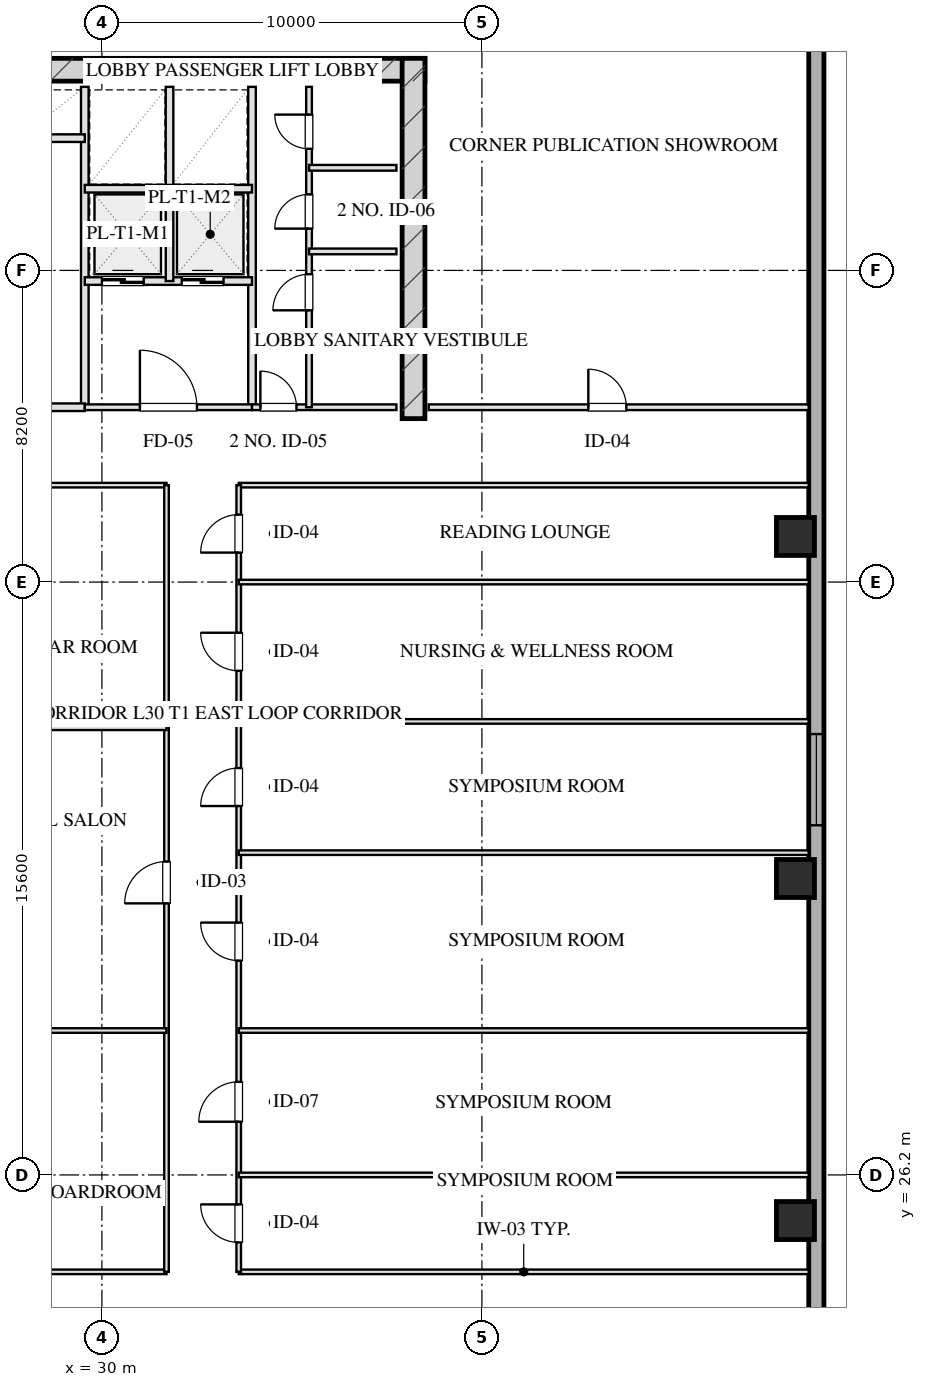
"""IFC4 building model, lengths in metres.
Left out: names, types, materials, properties, quantities, classifications, styles, units other than length and angle.
Written with IfcOpenShell. Run it as: python <this file> out.ifc"""

import sys

from ifc_helpers import new_model, si_unit, direction, frame, frame_2d, origin, origin_2d, place, context, subcontext, project, spatial, rectangle, hollow_rectangle, extrude, element, fill, save


model = new_model("IFC4")
c1 = context("Model", 3, precision=1e-05, world=origin(), true_north=direction((0.0, 1.0)))
c2 = subcontext(c1, "Body", "Model", "MODEL_VIEW")
j1 = project(units=[si_unit("LENGTHUNIT", "METRE"), si_unit("PLANEANGLEUNIT", "RADIAN")], contexts=[c1])
p1 = place(None, origin())
s1 = spatial("IfcSite", under=j1, at=p1, CompositionType="ELEMENT")
p2 = place(p1, origin())
s2 = spatial("IfcBuilding", under=s1, at=p2, CompositionType="ELEMENT")
p3 = place(p2, frame((0.0, 0.0, 117.3)))
s3 = spatial("IfcBuildingStorey", under=s2, at=p3, CompositionType="ELEMENT", Elevation=117.3)
p4 = place(p3, frame((21.5, 55.28, 0.0), z_axis=(0.0, 0.0, 1.0), x_axis=(1.0, 0.0, 0.0)))
e1 = element("IfcWall", 1, at=p4, inside=s3, PredefinedType="SHEAR", context=c2, shape_type="SweptSolid", body=[
    extrude(rectangle(XDim=17.0, YDim=0.6, at=frame_2d((8.5, 0.0))), origin(), (0.0, 0.0, 1.0), 3.45),
])
p5 = place(p3, frame((38.2, 46.1, 0.0), z_axis=(0.0, 0.0, 1.0), x_axis=(0.0, 1.0, 0.0)))
e2 = element("IfcWall", 2, at=p5, inside=s3, PredefinedType="SHEAR", context=c2, shape_type="SweptSolid", body=[
    extrude(rectangle(XDim=9.48, YDim=0.6, at=frame_2d((4.74, 0.0))), origin(), (0.0, 0.0, 1.0), 3.45),
])
for number, where, z_axis, x_axis in (
    (3, (48.25, 25.0, 0.0), (0.0, 0.0, 1.0), (1.0, 0.0, 0.0)),
    (4, (48.25, 34.0, 0.0), (0.0, 0.0, 1.0), (1.0, 0.0, 0.0)),
    (5, (48.25, 43.0, 0.0), (0.0, 0.0, 1.0), (1.0, 0.0, 0.0)),
):
    element("IfcColumn", number, at=place(p3, frame(where, z_axis=z_axis, x_axis=x_axis)), inside=s3, PredefinedType="COLUMN", context=c2, shape_type="SweptSolid", body=[
        extrude(hollow_rectangle(XDim=1.0, YDim=1.0, WallThickness=0.036, at=origin_2d()), origin(), (0.0, 0.0, 1.0), 3.451),
    ])
p6 = place(p3, frame((48.8, 59.0, 0.0), z_axis=(0.0, 0.0, 1.0), x_axis=(0.0, -1.0, 0.0)))
e6 = element("IfcWall", 6, at=p6, inside=s3, PredefinedType="SOLIDWALL", context=c2, shape_type="SweptSolid", body=[
    extrude(rectangle(XDim=50.0, YDim=0.4, at=frame_2d((25.0, 0.0))), origin(), (0.0, 0.0, 1.0), 2.61),
])
p7 = place(p6, frame((21.2, 0.0, 0.75)))
e7 = element("IfcOpeningElement", 7, at=p7, cuts=e6, PredefinedType="OPENING", context=c2, shape_type="SweptSolid", body=[
    extrude(rectangle(XDim=2.4, YDim=1.46, at=frame_2d((1.2, 0.73))), frame((0.0, 0.21, 0.0), z_axis=(0.0, -1.0, 0.0), x_axis=(1.0, 0.0, 0.0)), (0.0, 0.0, 1.0), 0.42),
])
p8 = place(p3, frame((29.55, 46.4, 0.0), z_axis=(0.0, 0.0, 1.0), x_axis=(0.0, 1.0, 0.0)))
e8 = element("IfcWall", 8, at=p8, inside=s3, PredefinedType="PARTITIONING", context=c2, shape_type="SweptSolid", body=[
    extrude(rectangle(XDim=8.43, YDim=0.2, at=frame_2d((4.215, 0.0))), origin(), (0.0, 0.0, 1.0), 3.175),
])
p9 = place(p3, frame((25.72, 46.4, 0.0), z_axis=(0.0, 0.0, 1.0), x_axis=(1.0, 0.0, 0.0)))
e9 = element("IfcWall", 9, at=p9, inside=s3, PredefinedType="PARTITIONING", context=c2, shape_type="SweptSolid", body=[
    extrude(rectangle(XDim=3.83, YDim=0.2, at=frame_2d((1.915, 0.0))), origin(), (0.0, 0.0, 1.0), 3.175),
])
p10 = place(p9, frame((1.35, 0.0, 0.0)))
e10 = element("IfcOpeningElement", 10, at=p10, cuts=e9, PredefinedType="OPENING", context=c2, shape_type="SweptSolid", body=[
    extrude(rectangle(XDim=1.2, YDim=2.05, at=frame_2d((0.6, 1.025))), frame((0.0, 0.11, 0.0), z_axis=(0.0, -1.0, 0.0), x_axis=(1.0, 0.0, 0.0)), (0.0, 0.0, 1.0), 0.22),
])
p11 = place(p3, frame((27.82, 53.48, 0.0), z_axis=(0.0, 0.0, 1.0), x_axis=(1.0, 0.0, 0.0)))
e11 = element("IfcWall", 11, at=p11, inside=s3, PredefinedType="PARTITIONING", context=c2, shape_type="SweptSolid", body=[
    extrude(rectangle(XDim=1.73, YDim=0.2, at=frame_2d((0.865, 0.0))), origin(), (0.0, 0.0, 1.0), 3.175),
])
p12 = place(p3, frame((33.95, 46.4, 0.0), z_axis=(0.0, 0.0, 1.0), x_axis=(0.0, 1.0, 0.0)))
e12 = element("IfcWall", 12, at=p12, inside=s3, PredefinedType="PARTITIONING", context=c2, shape_type="SweptSolid", body=[
    extrude(rectangle(XDim=8.43, YDim=0.2, at=frame_2d((4.215, 0.0))), origin(), (0.0, 0.0, 1.0), 3.175),
])
p13 = place(p3, frame((29.55, 46.4, 0.0), z_axis=(0.0, 0.0, 1.0), x_axis=(1.0, 0.0, 0.0)))
e13 = element("IfcWall", 13, at=p13, inside=s3, PredefinedType="PARTITIONING", context=c2, shape_type="SweptSolid", body=[
    extrude(rectangle(XDim=4.4, YDim=0.15, at=frame_2d((2.2, 0.0))), origin(), (0.0, 0.0, 1.0), 3.175),
])
p14 = place(p13, frame((1.45, 0.0, 0.0)))
e14 = element("IfcOpeningElement", 14, at=p14, cuts=e13, PredefinedType="OPENING", context=c2, shape_type="SweptSolid", body=[
    extrude(rectangle(XDim=1.5, YDim=2.05, at=frame_2d((0.75, 1.025))), frame((0.0, 0.085, 0.0), z_axis=(0.0, -1.0, 0.0), x_axis=(1.0, 0.0, 0.0)), (0.0, 0.0, 1.0), 0.17),
])
p15 = place(p3, frame((29.55, 49.72, 0.0), z_axis=(0.0, 0.0, 1.0), x_axis=(1.0, 0.0, 0.0)))
e15 = element("IfcWall", 15, at=p15, inside=s3, PredefinedType="PARTITIONING", context=c2, shape_type="SweptSolid", body=[
    extrude(rectangle(XDim=4.4, YDim=0.2, at=frame_2d((2.2, 0.0))), origin(), (0.0, 0.0, 1.0), 3.175),
])
p16 = place(p15, frame((0.45, 0.0, 0.0)))
e16 = element("IfcOpeningElement", 16, at=p16, cuts=e15, PredefinedType="OPENING", context=c2, shape_type="SweptSolid", body=[
    extrude(rectangle(XDim=1.1, YDim=2.05, at=frame_2d((0.55, 1.025))), frame((0.0, 0.11, 0.0), z_axis=(0.0, -1.0, 0.0), x_axis=(1.0, 0.0, 0.0)), (0.0, 0.0, 1.0), 0.22),
])
p17 = place(p15, frame((2.55, 0.0, 0.0)))
e17 = element("IfcOpeningElement", 17, at=p17, cuts=e15, PredefinedType="OPENING", context=c2, shape_type="SweptSolid", body=[
    extrude(rectangle(XDim=1.1, YDim=2.05, at=frame_2d((0.55, 1.025))), frame((0.0, 0.11, 0.0), z_axis=(0.0, -1.0, 0.0), x_axis=(1.0, 0.0, 0.0)), (0.0, 0.0, 1.0), 0.22),
])
p18 = place(p3, frame((31.78, 49.72, 0.0), z_axis=(0.0, 0.0, 1.0), x_axis=(0.0, 1.0, 0.0)))
e18 = element("IfcWall", 18, at=p18, inside=s3, PredefinedType="PARTITIONING", context=c2, shape_type="SweptSolid", body=[
    extrude(rectangle(XDim=5.11, YDim=0.2, at=frame_2d((2.555, 0.0))), origin(), (0.0, 0.0, 1.0), 3.175),
])
p19 = place(p3, frame((29.55, 52.15, 0.0), z_axis=(0.0, 0.0, 1.0), x_axis=(1.0, 0.0, 0.0)))
e19 = element("IfcWall", 19, at=p19, inside=s3, PredefinedType="PARTITIONING", context=c2, shape_type="SweptSolid", body=[
    extrude(rectangle(XDim=4.4, YDim=0.2, at=frame_2d((2.2, 0.0))), origin(), (0.0, 0.0, 1.0), 3.175),
])
p20 = place(p3, frame((33.95, 46.4, 0.0), z_axis=(0.0, 0.0, 1.0), x_axis=(1.0, 0.0, 0.0)))
e20 = element("IfcWall", 20, at=p20, inside=s3, PredefinedType="PARTITIONING", context=c2, shape_type="SweptSolid", body=[
    extrude(rectangle(XDim=3.8, YDim=0.15, at=frame_2d((1.9, 0.0))), origin(), (0.0, 0.0, 1.0), 3.175),
])
p21 = place(p20, frame((0.22, 0.0, 0.0)))
e21 = element("IfcOpeningElement", 21, at=p21, cuts=e20, PredefinedType="OPENING", context=c2, shape_type="SweptSolid", body=[
    extrude(rectangle(XDim=0.95, YDim=2.05, at=frame_2d((0.475, 1.025))), frame((0.0, 0.085, 0.0), z_axis=(0.0, -1.0, 0.0), x_axis=(1.0, 0.0, 0.0)), (0.0, 0.0, 1.0), 0.17),
])
p22 = place(p3, frame((35.45, 46.4, 0.0), z_axis=(0.0, 0.0, 1.0), x_axis=(0.0, 1.0, 0.0)))
e22 = element("IfcWall", 22, at=p22, inside=s3, PredefinedType="PARTITIONING", context=c2, shape_type="SweptSolid", body=[
    extrude(rectangle(XDim=8.43, YDim=0.15, at=frame_2d((4.215, 0.0))), origin(), (0.0, 0.0, 1.0), 2.765),
])
p23 = place(p22, frame((2.55, 0.0, 0.0)))
e23 = element("IfcOpeningElement", 23, at=p23, cuts=e22, PredefinedType="OPENING", context=c2, shape_type="SweptSolid", body=[
    extrude(rectangle(XDim=0.95, YDim=2.05, at=frame_2d((0.475, 1.025))), frame((0.0, 0.085, 0.0), z_axis=(0.0, -1.0, 0.0), x_axis=(1.0, 0.0, 0.0)), (0.0, 0.0, 1.0), 0.17),
])
p24 = place(p22, frame((4.7, 0.0, 0.0)))
e24 = element("IfcOpeningElement", 24, at=p24, cuts=e22, PredefinedType="OPENING", context=c2, shape_type="SweptSolid", body=[
    extrude(rectangle(XDim=0.9, YDim=2.05, at=frame_2d((0.45, 1.025))), frame((0.0, 0.085, 0.0), z_axis=(0.0, -1.0, 0.0), x_axis=(1.0, 0.0, 0.0)), (0.0, 0.0, 1.0), 0.17),
])
p25 = place(p22, frame((6.8, 0.0, 0.0)))
e25 = element("IfcOpeningElement", 25, at=p25, cuts=e22, PredefinedType="OPENING", context=c2, shape_type="SweptSolid", body=[
    extrude(rectangle(XDim=0.9, YDim=2.05, at=frame_2d((0.45, 1.025))), frame((0.0, 0.085, 0.0), z_axis=(0.0, -1.0, 0.0), x_axis=(1.0, 0.0, 0.0)), (0.0, 0.0, 1.0), 0.17),
])
for number, where, z_axis, x_axis in (
    (26, (35.45, 50.5, 0.0), (0.0, 0.0, 1.0), (1.0, 0.0, 0.0)),
    (27, (35.45, 52.7, 0.0), (0.0, 0.0, 1.0), (1.0, 0.0, 0.0)),
):
    element("IfcWall", number, at=place(p3, frame(where, z_axis=z_axis, x_axis=x_axis)), inside=s3, PredefinedType="PARTITIONING", context=c2, shape_type="SweptSolid", body=[
        extrude(rectangle(XDim=2.3, YDim=0.15, at=frame_2d((1.15, 0.0))), origin(), (0.0, 0.0, 1.0), 3.175),
    ])
p26 = place(p3, frame((38.6, 46.4, 0.0), z_axis=(0.0, 0.0, 1.0), x_axis=(1.0, 0.0, 0.0)))
e28 = element("IfcWall", 28, at=p26, inside=s3, PredefinedType="PARTITIONING", context=c2, shape_type="SweptSolid", body=[
    extrude(rectangle(XDim=10.0, YDim=0.15, at=frame_2d((5.0, 0.0))), origin(), (0.0, 0.0, 1.0), 3.175),
])
p27 = place(p26, frame((4.2, 0.0, 0.0)))
e29 = element("IfcOpeningElement", 29, at=p27, cuts=e28, PredefinedType="OPENING", context=c2, shape_type="SweptSolid", body=[
    extrude(rectangle(XDim=1.0, YDim=2.05, at=frame_2d((0.5, 1.025))), frame((0.0, 0.085, 0.0), z_axis=(0.0, -1.0, 0.0), x_axis=(1.0, 0.0, 0.0)), (0.0, 0.0, 1.0), 0.17),
])
p28 = place(p3, frame((23.8, 23.65, 0.0), z_axis=(0.0, 0.0, 1.0), x_axis=(1.0, 0.0, 0.0)))
e30 = element("IfcWall", 30, at=p28, inside=s3, PredefinedType="PARTITIONING", context=c2, shape_type="SweptSolid", body=[
    extrude(rectangle(XDim=7.9, YDim=0.12, at=frame_2d((3.95, 0.0))), origin(), (0.0, 0.0, 1.0), 3.175),
])
p29 = place(p3, frame((33.6, 23.65, 0.0), z_axis=(0.0, 0.0, 1.0), x_axis=(1.0, 0.0, 0.0)))
e31 = element("IfcWall", 31, at=p29, inside=s3, PredefinedType="PARTITIONING", context=c2, shape_type="SweptSolid", body=[
    extrude(rectangle(XDim=15.0, YDim=0.12, at=frame_2d((7.5, 0.0))), origin(), (0.0, 0.0, 1.0), 3.175),
])
p30 = place(p3, frame((23.8, 44.35, 0.0), z_axis=(0.0, 0.0, 1.0), x_axis=(1.0, 0.0, 0.0)))
e32 = element("IfcWall", 32, at=p30, inside=s3, PredefinedType="PARTITIONING", context=c2, shape_type="SweptSolid", body=[
    extrude(rectangle(XDim=7.9, YDim=0.12, at=frame_2d((3.95, 0.0))), origin(), (0.0, 0.0, 1.0), 3.175),
])
p31 = place(p3, frame((33.6, 44.35, 0.0), z_axis=(0.0, 0.0, 1.0), x_axis=(1.0, 0.0, 0.0)))
e33 = element("IfcWall", 33, at=p31, inside=s3, PredefinedType="PARTITIONING", context=c2, shape_type="SweptSolid", body=[
    extrude(rectangle(XDim=15.0, YDim=0.12, at=frame_2d((7.5, 0.0))), origin(), (0.0, 0.0, 1.0), 3.175),
])
p32 = place(p3, frame((31.7, 23.65, 0.0), z_axis=(0.0, 0.0, 1.0), x_axis=(0.0, 1.0, 0.0)))
e34 = element("IfcWall", 34, at=p32, inside=s3, PredefinedType="PARTITIONING", context=c2, shape_type="SweptSolid", body=[
    extrude(rectangle(XDim=20.7, YDim=0.12, at=frame_2d((10.35, 0.0))), origin(), (0.0, 0.0, 1.0), 3.175),
])
p33 = place(p32, frame((9.696, 0.0, 0.0)))
e35 = element("IfcOpeningElement", 35, at=p33, cuts=e34, PredefinedType="OPENING", context=c2, shape_type="SweptSolid", body=[
    extrude(rectangle(XDim=1.1, YDim=2.05, at=frame_2d((0.55, 1.025))), frame((0.0, 0.07, 0.0), z_axis=(0.0, -1.0, 0.0), x_axis=(1.0, 0.0, 0.0)), (0.0, 0.0, 1.0), 0.14),
])
p34 = place(p3, frame((33.6, 23.65, 0.0), z_axis=(0.0, 0.0, 1.0), x_axis=(0.0, 1.0, 0.0)))
e36 = element("IfcWall", 36, at=p34, inside=s3, PredefinedType="PARTITIONING", context=c2, shape_type="SweptSolid", body=[
    extrude(rectangle(XDim=20.7, YDim=0.12, at=frame_2d((10.35, 0.0))), origin(), (0.0, 0.0, 1.0), 3.175),
])
p35 = place(p34, frame((0.775, 0.0, 0.0)))
e37 = element("IfcOpeningElement", 37, at=p35, cuts=e36, PredefinedType="OPENING", context=c2, shape_type="SweptSolid", body=[
    extrude(rectangle(XDim=1.0, YDim=2.05, at=frame_2d((0.5, 1.025))), frame((0.0, 0.07, 0.0), z_axis=(0.0, -1.0, 0.0), x_axis=(1.0, 0.0, 0.0)), (0.0, 0.0, 1.0), 0.14),
])
p36 = place(p34, frame((3.95, 0.0, 0.0)))
e38 = element("IfcOpeningElement", 38, at=p36, cuts=e36, PredefinedType="OPENING", context=c2, shape_type="SweptSolid", body=[
    extrude(rectangle(XDim=1.05, YDim=2.05, at=frame_2d((0.525, 1.025))), frame((0.0, 0.07, 0.0), z_axis=(0.0, -1.0, 0.0), x_axis=(1.0, 0.0, 0.0)), (0.0, 0.0, 1.0), 0.14),
])
p37 = place(p34, frame((8.19, 0.0, 0.0)))
e39 = element("IfcOpeningElement", 39, at=p37, cuts=e36, PredefinedType="OPENING", context=c2, shape_type="SweptSolid", body=[
    extrude(rectangle(XDim=1.0, YDim=2.05, at=frame_2d((0.5, 1.025))), frame((0.0, 0.07, 0.0), z_axis=(0.0, -1.0, 0.0), x_axis=(1.0, 0.0, 0.0)), (0.0, 0.0, 1.0), 0.14),
])
p38 = place(p34, frame((12.257, 0.0, 0.0)))
e40 = element("IfcOpeningElement", 40, at=p38, cuts=e36, PredefinedType="OPENING", context=c2, shape_type="SweptSolid", body=[
    extrude(rectangle(XDim=1.0, YDim=2.05, at=frame_2d((0.5, 1.025))), frame((0.0, 0.07, 0.0), z_axis=(0.0, -1.0, 0.0), x_axis=(1.0, 0.0, 0.0)), (0.0, 0.0, 1.0), 0.14),
])
p39 = place(p34, frame((15.816, 0.0, 0.0)))
e41 = element("IfcOpeningElement", 41, at=p39, cuts=e36, PredefinedType="OPENING", context=c2, shape_type="SweptSolid", body=[
    extrude(rectangle(XDim=1.0, YDim=2.05, at=frame_2d((0.5, 1.025))), frame((0.0, 0.07, 0.0), z_axis=(0.0, -1.0, 0.0), x_axis=(1.0, 0.0, 0.0)), (0.0, 0.0, 1.0), 0.14),
])
p40 = place(p34, frame((18.925, 0.0, 0.0)))
e42 = element("IfcOpeningElement", 42, at=p40, cuts=e36, PredefinedType="OPENING", context=c2, shape_type="SweptSolid", body=[
    extrude(rectangle(XDim=1.0, YDim=2.05, at=frame_2d((0.5, 1.025))), frame((0.0, 0.07, 0.0), z_axis=(0.0, -1.0, 0.0), x_axis=(1.0, 0.0, 0.0)), (0.0, 0.0, 1.0), 0.14),
])
for number, where, z_axis, x_axis in (
    (43, (23.8, 30.0, 0.0), (0.0, 0.0, 1.0), (1.0, 0.0, 0.0)),
    (44, (23.8, 37.966, 0.0), (0.0, 0.0, 1.0), (1.0, 0.0, 0.0)),
):
    element("IfcWall", number, at=place(p3, frame(where, z_axis=z_axis, x_axis=x_axis)), inside=s3, PredefinedType="PARTITIONING", context=c2, shape_type="SweptSolid", body=[
        extrude(rectangle(XDim=7.9, YDim=0.12, at=frame_2d((3.95, 0.0))), origin(), (0.0, 0.0, 1.0), 3.175),
    ])
for number, where, z_axis, x_axis in (
    (45, (33.6, 26.2, 0.0), (0.0, 0.0, 1.0), (1.0, 0.0, 0.0)),
    (46, (33.6, 30.0, 0.0), (0.0, 0.0, 1.0), (1.0, 0.0, 0.0)),
    (47, (33.6, 34.68, 0.0), (0.0, 0.0, 1.0), (1.0, 0.0, 0.0)),
    (48, (33.6, 38.133, 0.0), (0.0, 0.0, 1.0), (1.0, 0.0, 0.0)),
    (49, (33.6, 41.8, 0.0), (0.0, 0.0, 1.0), (1.0, 0.0, 0.0)),
):
    element("IfcWall", number, at=place(p3, frame(where, z_axis=z_axis, x_axis=x_axis)), inside=s3, PredefinedType="PARTITIONING", context=c2, shape_type="SweptSolid", body=[
        extrude(rectangle(XDim=15.0, YDim=0.12, at=frame_2d((7.5, 0.0))), origin(), (0.0, 0.0, 1.0), 3.175),
    ])
p41 = place(p7, origin())
e50 = element("IfcWindow", 50, at=p41, inside=s3, PartitioningType="TRIPLE_PANEL_VERTICAL", PredefinedType="WINDOW", context=c2, shape_type="SweptSolid", body=[
    extrude(rectangle(XDim=2.4, YDim=1.46, at=frame_2d((1.2, 0.73))), frame((0.0, 0.03, 0.0), z_axis=(0.0, -1.0, 0.0), x_axis=(1.0, 0.0, 0.0)), (0.0, 0.0, 1.0), 0.06),
])
fill(e7, e50)
p42 = place(p14, origin())
e51 = element("IfcDoor", 51, at=p42, inside=s3, OperationType="SINGLE_SWING_LEFT", PredefinedType="DOOR", context=c2, shape_type="SweptSolid", body=[
    extrude(rectangle(XDim=1.5, YDim=2.05, at=frame_2d((0.75, 1.025))), frame((0.0, 0.025, 0.0), z_axis=(0.0, -1.0, 0.0), x_axis=(1.0, 0.0, 0.0)), (0.0, 0.0, 1.0), 0.05),
])
fill(e14, e51)
p43 = place(p16, origin())
e52 = element("IfcDoor", 52, at=p43, inside=s3, OperationType="DOUBLE_DOOR_SLIDING", PredefinedType="DOOR", context=c2, shape_type="SweptSolid", body=[
    extrude(rectangle(XDim=1.1, YDim=2.05, at=frame_2d((0.55, 1.025))), frame((0.0, 0.025, 0.0), z_axis=(0.0, -1.0, 0.0), x_axis=(1.0, 0.0, 0.0)), (0.0, 0.0, 1.0), 0.05),
])
fill(e16, e52)
p44 = place(p17, origin())
e53 = element("IfcDoor", 53, at=p44, inside=s3, OperationType="DOUBLE_DOOR_SLIDING", PredefinedType="DOOR", context=c2, shape_type="SweptSolid", body=[
    extrude(rectangle(XDim=1.1, YDim=2.05, at=frame_2d((0.55, 1.025))), frame((0.0, 0.025, 0.0), z_axis=(0.0, -1.0, 0.0), x_axis=(1.0, 0.0, 0.0)), (0.0, 0.0, 1.0), 0.05),
])
fill(e17, e53)
p45 = place(p21, origin())
e54 = element("IfcDoor", 54, at=p45, inside=s3, OperationType="SINGLE_SWING_LEFT", PredefinedType="DOOR", context=c2, shape_type="SweptSolid", body=[
    extrude(rectangle(XDim=0.95, YDim=2.05, at=frame_2d((0.475, 1.025))), frame((0.0, 0.025, 0.0), z_axis=(0.0, -1.0, 0.0), x_axis=(1.0, 0.0, 0.0)), (0.0, 0.0, 1.0), 0.05),
])
fill(e21, e54)
p46 = place(p23, origin())
e55 = element("IfcDoor", 55, at=p46, inside=s3, OperationType="SINGLE_SWING_LEFT", PredefinedType="DOOR", context=c2, shape_type="SweptSolid", body=[
    extrude(rectangle(XDim=0.95, YDim=2.05, at=frame_2d((0.475, 1.025))), frame((0.0, 0.025, 0.0), z_axis=(0.0, -1.0, 0.0), x_axis=(1.0, 0.0, 0.0)), (0.0, 0.0, 1.0), 0.05),
])
fill(e23, e55)
p47 = place(p24, origin())
e56 = element("IfcDoor", 56, at=p47, inside=s3, OperationType="SINGLE_SWING_LEFT", PredefinedType="DOOR", context=c2, shape_type="SweptSolid", body=[
    extrude(rectangle(XDim=0.9, YDim=2.05, at=frame_2d((0.45, 1.025))), frame((0.0, 0.025, 0.0), z_axis=(0.0, -1.0, 0.0), x_axis=(1.0, 0.0, 0.0)), (0.0, 0.0, 1.0), 0.05),
])
fill(e24, e56)
p48 = place(p25, origin())
e57 = element("IfcDoor", 57, at=p48, inside=s3, OperationType="SINGLE_SWING_RIGHT", PredefinedType="DOOR", context=c2, shape_type="SweptSolid", body=[
    extrude(rectangle(XDim=0.9, YDim=2.05, at=frame_2d((0.45, 1.025))), frame((0.0, 0.025, 0.0), z_axis=(0.0, -1.0, 0.0), x_axis=(1.0, 0.0, 0.0)), (0.0, 0.0, 1.0), 0.05),
])
fill(e25, e57)
p49 = place(p27, origin())
e58 = element("IfcDoor", 58, at=p49, inside=s3, OperationType="SINGLE_SWING_LEFT", PredefinedType="DOOR", context=c2, shape_type="SweptSolid", body=[
    extrude(rectangle(XDim=1.0, YDim=2.05, at=frame_2d((0.5, 1.025))), frame((0.0, 0.025, 0.0), z_axis=(0.0, -1.0, 0.0), x_axis=(1.0, 0.0, 0.0)), (0.0, 0.0, 1.0), 0.05),
])
fill(e29, e58)
p50 = place(p33, origin())
e59 = element("IfcDoor", 59, at=p50, inside=s3, OperationType="SINGLE_SWING_LEFT", PredefinedType="DOOR", context=c2, shape_type="SweptSolid", body=[
    extrude(rectangle(XDim=1.1, YDim=2.05, at=frame_2d((0.55, 1.025))), frame((0.0, 0.025, 0.0), z_axis=(0.0, -1.0, 0.0), x_axis=(1.0, 0.0, 0.0)), (0.0, 0.0, 1.0), 0.05),
])
fill(e35, e59)
p51 = place(p35, origin())
e60 = element("IfcDoor", 60, at=p51, inside=s3, OperationType="SINGLE_SWING_RIGHT", PredefinedType="DOOR", context=c2, shape_type="SweptSolid", body=[
    extrude(rectangle(XDim=1.0, YDim=2.05, at=frame_2d((0.5, 1.025))), frame((0.0, 0.025, 0.0), z_axis=(0.0, -1.0, 0.0), x_axis=(1.0, 0.0, 0.0)), (0.0, 0.0, 1.0), 0.05),
])
fill(e37, e60)
p52 = place(p36, origin())
e61 = element("IfcDoor", 61, at=p52, inside=s3, OperationType="SINGLE_SWING_LEFT", PredefinedType="DOOR", context=c2, shape_type="SweptSolid", body=[
    extrude(rectangle(XDim=1.05, YDim=2.05, at=frame_2d((0.525, 1.025))), frame((0.0, 0.025, 0.0), z_axis=(0.0, -1.0, 0.0), x_axis=(1.0, 0.0, 0.0)), (0.0, 0.0, 1.0), 0.05),
])
fill(e38, e61)
p53 = place(p37, origin())
e62 = element("IfcDoor", 62, at=p53, inside=s3, OperationType="SINGLE_SWING_RIGHT", PredefinedType="DOOR", context=c2, shape_type="SweptSolid", body=[
    extrude(rectangle(XDim=1.0, YDim=2.05, at=frame_2d((0.5, 1.025))), frame((0.0, 0.025, 0.0), z_axis=(0.0, -1.0, 0.0), x_axis=(1.0, 0.0, 0.0)), (0.0, 0.0, 1.0), 0.05),
])
fill(e39, e62)
p54 = place(p38, origin())
e63 = element("IfcDoor", 63, at=p54, inside=s3, OperationType="SINGLE_SWING_LEFT", PredefinedType="DOOR", context=c2, shape_type="SweptSolid", body=[
    extrude(rectangle(XDim=1.0, YDim=2.05, at=frame_2d((0.5, 1.025))), frame((0.0, 0.025, 0.0), z_axis=(0.0, -1.0, 0.0), x_axis=(1.0, 0.0, 0.0)), (0.0, 0.0, 1.0), 0.05),
])
fill(e40, e63)
p55 = place(p39, origin())
e64 = element("IfcDoor", 64, at=p55, inside=s3, OperationType="SINGLE_SWING_RIGHT", PredefinedType="DOOR", context=c2, shape_type="SweptSolid", body=[
    extrude(rectangle(XDim=1.0, YDim=2.05, at=frame_2d((0.5, 1.025))), frame((0.0, 0.025, 0.0), z_axis=(0.0, -1.0, 0.0), x_axis=(1.0, 0.0, 0.0)), (0.0, 0.0, 1.0), 0.05),
])
fill(e41, e64)
p56 = place(p40, origin())
e65 = element("IfcDoor", 65, at=p56, inside=s3, OperationType="SINGLE_SWING_LEFT", PredefinedType="DOOR", context=c2, shape_type="SweptSolid", body=[
    extrude(rectangle(XDim=1.0, YDim=2.05, at=frame_2d((0.5, 1.025))), frame((0.0, 0.025, 0.0), z_axis=(0.0, -1.0, 0.0), x_axis=(1.0, 0.0, 0.0)), (0.0, 0.0, 1.0), 0.05),
])
fill(e42, e65)
save(model, sys.argv[1])
